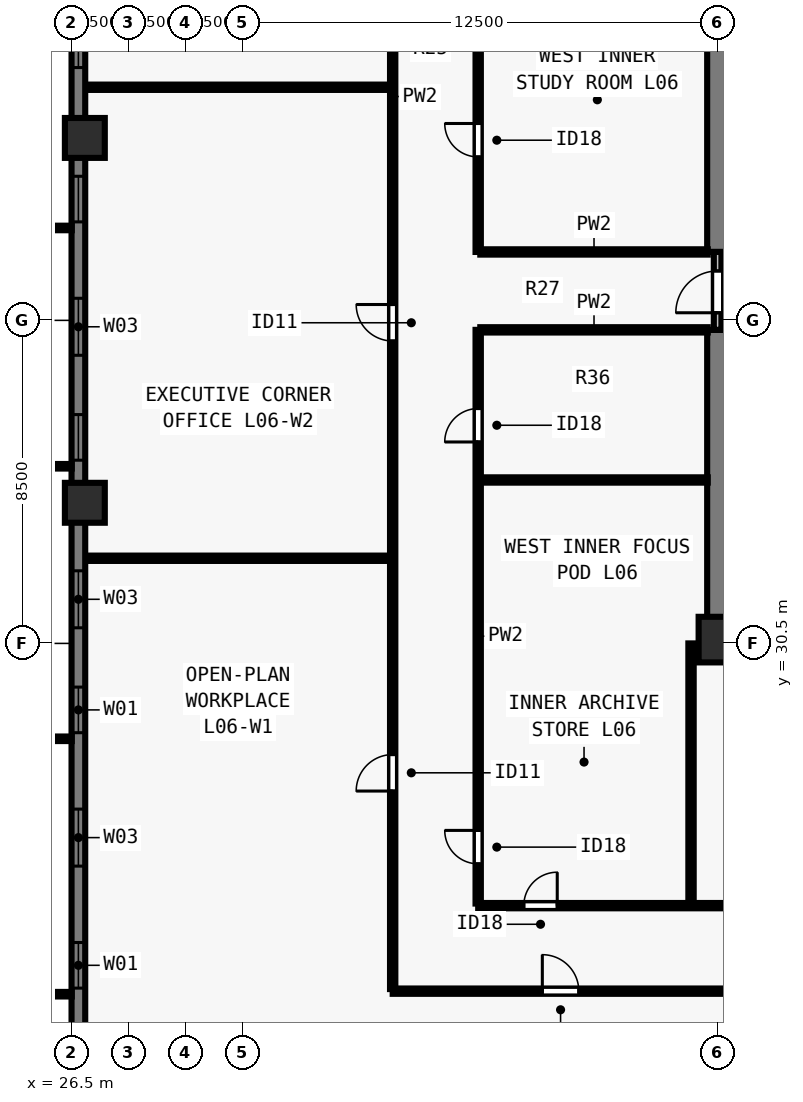
"""IFC4 building model, lengths in metres.
Left out: names, types, materials, properties, quantities, classifications, styles, units other than length and angle.
Written with IfcOpenShell. Run it as: python <this file> out.ifc"""

import sys

from ifc_helpers import new_model, si_unit, direction, frame, frame_2d, origin, origin_2d, place, context, subcontext, project, spatial, rectangle, extrude, element, fill, save


model = new_model("IFC4")
c1 = context("Model", 3, precision=1e-05, world=origin(), true_north=direction((0.0, 1.0)))
c2 = subcontext(c1, "Body", "Model", "MODEL_VIEW")
j1 = project(units=[si_unit("LENGTHUNIT", "METRE"), si_unit("PLANEANGLEUNIT", "RADIAN")], contexts=[c1])
p1 = place(None, origin())
s1 = spatial("IfcSite", under=j1, at=p1, CompositionType="ELEMENT")
p2 = place(p1, origin())
s2 = spatial("IfcBuilding", under=s1, at=p2, CompositionType="ELEMENT")
p3 = place(p2, frame((0.0, 0.0, 27.0)))
s3 = spatial("IfcBuildingStorey", under=s2, at=p3, CompositionType="ELEMENT", Elevation=27.0)
p4 = place(p3, frame((43.6, 30.6, 0.0), z_axis=(0.0, 0.0, 1.0), x_axis=(1.0, 0.0, 0.0)))
e1 = element("IfcColumn", 1, at=p4, inside=s3, PredefinedType="COLUMN", context=c2, shape_type="SweptSolid", body=[
    extrude(rectangle(XDim=1.2, YDim=1.2, at=origin_2d()), origin(), (0.0, 0.0, 1.0), 3.5),
])
for number, where, z_axis, x_axis in (
    (2, (26.85, 43.8, 0.0), (0.0, 0.0, 1.0), (0.0, 1.0, 0.0)),
    (3, (26.85, 34.2, 0.0), (0.0, 0.0, 1.0), (0.0, 1.0, 0.0)),
):
    element("IfcColumn", number, at=place(p3, frame(where, z_axis=z_axis, x_axis=x_axis)), inside=s3, PredefinedType="COLUMN", context=c2, shape_type="SweptSolid", body=[
        extrude(rectangle(XDim=1.05, YDim=1.05, at=origin_2d()), origin(), (0.0, 0.0, 1.0), 3.5),
    ])
p5 = place(p3, frame((26.68, 16.5, 0.0), z_axis=(0.0, 0.0, 1.0), x_axis=(0.0, 1.0, 0.0)))
e4 = element("IfcWall", 4, at=p5, inside=s3, PredefinedType="SOLIDWALL", context=c2, shape_type="SweptSolid", body=[
    extrude(rectangle(XDim=44.662, YDim=0.36, at=frame_2d((22.331, 0.0))), origin(), (0.0, 0.0, 1.0), 3.28),
])
p6 = place(p5, frame((4.93, 0.0, 0.8)))
e5 = element("IfcOpeningElement", 5, at=p6, cuts=e4, PredefinedType="OPENING", context=c2, shape_type="SweptSolid", body=[
    extrude(rectangle(XDim=1.2, YDim=1.544, at=frame_2d((0.6, 0.772))), frame((0.0, 0.19, 0.0), z_axis=(0.0, -1.0, 0.0), x_axis=(1.0, 0.0, 0.0)), (0.0, 0.0, 1.0), 0.38),
])
p7 = place(p5, frame((8.14, 0.0, 0.8)))
e6 = element("IfcOpeningElement", 6, at=p7, cuts=e4, PredefinedType="OPENING", context=c2, shape_type="SweptSolid", body=[
    extrude(rectangle(XDim=1.5, YDim=1.544, at=frame_2d((0.75, 0.772))), frame((0.0, 0.19, 0.0), z_axis=(0.0, -1.0, 0.0), x_axis=(1.0, 0.0, 0.0)), (0.0, 0.0, 1.0), 0.38),
])
p8 = place(p5, frame((11.65, 0.0, 0.8)))
e7 = element("IfcOpeningElement", 7, at=p8, cuts=e4, PredefinedType="OPENING", context=c2, shape_type="SweptSolid", body=[
    extrude(rectangle(XDim=1.2, YDim=1.544, at=frame_2d((0.6, 0.772))), frame((0.0, 0.19, 0.0), z_axis=(0.0, -1.0, 0.0), x_axis=(1.0, 0.0, 0.0)), (0.0, 0.0, 1.0), 0.38),
])
p9 = place(p5, frame((14.411, 0.0, 0.8)))
e8 = element("IfcOpeningElement", 8, at=p9, cuts=e4, PredefinedType="OPENING", context=c2, shape_type="SweptSolid", body=[
    extrude(rectangle(XDim=1.5, YDim=1.544, at=frame_2d((0.75, 0.772))), frame((0.0, 0.19, 0.0), z_axis=(0.0, -1.0, 0.0), x_axis=(1.0, 0.0, 0.0)), (0.0, 0.0, 1.0), 0.38),
])
p10 = place(p5, frame((18.821, 0.0, 0.8)))
e9 = element("IfcOpeningElement", 9, at=p10, cuts=e4, PredefinedType="OPENING", context=c2, shape_type="SweptSolid", body=[
    extrude(rectangle(XDim=1.2, YDim=1.544, at=frame_2d((0.6, 0.772))), frame((0.0, 0.19, 0.0), z_axis=(0.0, -1.0, 0.0), x_axis=(1.0, 0.0, 0.0)), (0.0, 0.0, 1.0), 0.38),
])
p11 = place(p5, frame((21.581, 0.0, 0.8)))
e10 = element("IfcOpeningElement", 10, at=p11, cuts=e4, PredefinedType="OPENING", context=c2, shape_type="SweptSolid", body=[
    extrude(rectangle(XDim=1.5, YDim=1.544, at=frame_2d((0.75, 0.772))), frame((0.0, 0.19, 0.0), z_axis=(0.0, -1.0, 0.0), x_axis=(1.0, 0.0, 0.0)), (0.0, 0.0, 1.0), 0.38),
])
p12 = place(p5, frame((25.091, 0.0, 0.8)))
e11 = element("IfcOpeningElement", 11, at=p12, cuts=e4, PredefinedType="OPENING", context=c2, shape_type="SweptSolid", body=[
    extrude(rectangle(XDim=1.2, YDim=1.544, at=frame_2d((0.6, 0.772))), frame((0.0, 0.19, 0.0), z_axis=(0.0, -1.0, 0.0), x_axis=(1.0, 0.0, 0.0)), (0.0, 0.0, 1.0), 0.38),
])
p13 = place(p5, frame((29.151, 0.0, 0.8)))
e12 = element("IfcOpeningElement", 12, at=p13, cuts=e4, PredefinedType="OPENING", context=c2, shape_type="SweptSolid", body=[
    extrude(rectangle(XDim=1.5, YDim=1.544, at=frame_2d((0.75, 0.772))), frame((0.0, 0.19, 0.0), z_axis=(0.0, -1.0, 0.0), x_axis=(1.0, 0.0, 0.0)), (0.0, 0.0, 1.0), 0.38),
])
p14 = place(p5, frame((31.812, 0.0, 0.8)))
e13 = element("IfcOpeningElement", 13, at=p14, cuts=e4, PredefinedType="OPENING", context=c2, shape_type="SweptSolid", body=[
    extrude(rectangle(XDim=1.2, YDim=1.544, at=frame_2d((0.6, 0.772))), frame((0.0, 0.19, 0.0), z_axis=(0.0, -1.0, 0.0), x_axis=(1.0, 0.0, 0.0)), (0.0, 0.0, 1.0), 0.38),
])
p15 = place(p5, frame((35.022, 0.0, 0.8)))
e14 = element("IfcOpeningElement", 14, at=p15, cuts=e4, PredefinedType="OPENING", context=c2, shape_type="SweptSolid", body=[
    extrude(rectangle(XDim=1.5, YDim=1.544, at=frame_2d((0.75, 0.772))), frame((0.0, 0.19, 0.0), z_axis=(0.0, -1.0, 0.0), x_axis=(1.0, 0.0, 0.0)), (0.0, 0.0, 1.0), 0.38),
])
p16 = place(p5, frame((38.532, 0.0, 0.8)))
e15 = element("IfcOpeningElement", 15, at=p16, cuts=e4, PredefinedType="OPENING", context=c2, shape_type="SweptSolid", body=[
    extrude(rectangle(XDim=1.2, YDim=1.544, at=frame_2d((0.6, 0.772))), frame((0.0, 0.19, 0.0), z_axis=(0.0, -1.0, 0.0), x_axis=(1.0, 0.0, 0.0)), (0.0, 0.0, 1.0), 0.38),
])
p17 = place(p3, frame((43.225, 30.5, 0.0), z_axis=(0.0, 0.0, 1.0), x_axis=(1.0, 0.0, 0.0)))
e16 = element("IfcWall", 16, at=p17, inside=s3, PredefinedType="SHEAR", context=c2, shape_type="SweptSolid", body=[
    extrude(rectangle(XDim=17.55, YDim=0.55, at=frame_2d((8.775, 0.0))), origin(), (0.0, 0.0, 1.0), 3.28),
])
p18 = place(p3, frame((43.5, 30.765, 0.0), z_axis=(0.0, 0.0, 1.0), x_axis=(0.0, 1.0, 0.0)))
e17 = element("IfcWall", 17, at=p18, inside=s3, PredefinedType="SHEAR", context=c2, shape_type="SweptSolid", body=[
    extrude(rectangle(XDim=7.985, YDim=0.55, at=frame_2d((3.993, 0.0))), origin(), (0.0, 0.0, 1.0), 3.28),
])
p19 = place(p3, frame((43.5, 40.8, 0.0), z_axis=(0.0, 0.0, 1.0), x_axis=(0.0, 1.0, 0.0)))
e18 = element("IfcWall", 18, at=p19, inside=s3, PredefinedType="SHEAR", context=c2, shape_type="SweptSolid", body=[
    extrude(rectangle(XDim=6.435, YDim=0.55, at=frame_2d((3.218, 0.0))), origin(), (0.0, 0.0, 1.0), 3.28),
])
p20 = place(p3, frame((43.5, 38.75, 0.0), z_axis=(0.0, 0.0, 1.0), x_axis=(0.0, 1.0, 0.0)))
e19 = element("IfcWall", 19, at=p20, inside=s3, PredefinedType="SOLIDWALL", context=c2, shape_type="SweptSolid", body=[
    extrude(rectangle(XDim=2.05, YDim=0.2, at=frame_2d((1.025, 0.0))), origin(), (0.0, 0.0, 1.0), 3.28),
])
p21 = place(p20, frame((0.45, 0.0, 0.0)))
e20 = element("IfcOpeningElement", 20, at=p21, cuts=e19, PredefinedType="OPENING", context=c2, shape_type="SweptSolid", body=[
    extrude(rectangle(XDim=1.1, YDim=2.15, at=frame_2d((0.55, 1.075))), frame((0.0, 0.11, 0.0), z_axis=(0.0, -1.0, 0.0), x_axis=(1.0, 0.0, 0.0)), (0.0, 0.0, 1.0), 0.22),
])
p22 = place(p3, frame((34.95, 21.35, 0.0), z_axis=(0.0, 0.0, 1.0), x_axis=(1.0, 0.0, 0.0)))
e21 = element("IfcWall", 21, at=p22, inside=s3, PredefinedType="PARTITIONING", context=c2, shape_type="SweptSolid", body=[
    extrude(rectangle(XDim=34.1, YDim=0.14, at=frame_2d((17.05, 0.0))), origin(), (0.0, 0.0, 1.0), 3.28),
])
p23 = place(p22, frame((3.938, 0.0, 0.0)))
e22 = element("IfcOpeningElement", 22, at=p23, cuts=e21, PredefinedType="OPENING", context=c2, shape_type="SweptSolid", body=[
    extrude(rectangle(XDim=0.96, YDim=2.12, at=frame_2d((0.48, 1.06))), frame((0.0, 0.08, 0.0), z_axis=(0.0, -1.0, 0.0), x_axis=(1.0, 0.0, 0.0)), (0.0, 0.0, 1.0), 0.16),
])
p24 = place(p22, frame((28.617, 0.0, 0.0)))
e23 = element("IfcOpeningElement", 23, at=p24, cuts=e21, PredefinedType="OPENING", context=c2, shape_type="SweptSolid", body=[
    extrude(rectangle(XDim=0.96, YDim=2.12, at=frame_2d((0.48, 1.06))), frame((0.0, 0.08, 0.0), z_axis=(0.0, -1.0, 0.0), x_axis=(1.0, 0.0, 0.0)), (0.0, 0.0, 1.0), 0.16),
])
p25 = place(p3, frame((34.95, 21.405, 0.0), z_axis=(0.0, 0.0, 1.0), x_axis=(0.0, 1.0, 0.0)))
e24 = element("IfcWall", 24, at=p25, inside=s3, PredefinedType="PARTITIONING", context=c2, shape_type="SweptSolid", body=[
    extrude(rectangle(XDim=35.19, YDim=0.14, at=frame_2d((17.595, 0.0))), origin(), (0.0, 0.0, 1.0), 3.28),
])
p26 = place(p25, frame((5.21, 0.0, 0.0)))
e25 = element("IfcOpeningElement", 25, at=p26, cuts=e24, PredefinedType="OPENING", context=c2, shape_type="SweptSolid", body=[
    extrude(rectangle(XDim=0.96, YDim=2.12, at=frame_2d((0.48, 1.06))), frame((0.0, 0.08, 0.0), z_axis=(0.0, -1.0, 0.0), x_axis=(1.0, 0.0, 0.0)), (0.0, 0.0, 1.0), 0.16),
])
p27 = place(p25, frame((17.052, 0.0, 0.0)))
e26 = element("IfcOpeningElement", 26, at=p27, cuts=e24, PredefinedType="OPENING", context=c2, shape_type="SweptSolid", body=[
    extrude(rectangle(XDim=0.96, YDim=2.12, at=frame_2d((0.48, 1.06))), frame((0.0, 0.08, 0.0), z_axis=(0.0, -1.0, 0.0), x_axis=(1.0, 0.0, 0.0)), (0.0, 0.0, 1.0), 0.16),
])
p28 = place(p25, frame((28.957, 0.0, 0.0)))
e27 = element("IfcOpeningElement", 27, at=p28, cuts=e24, PredefinedType="OPENING", context=c2, shape_type="SweptSolid", body=[
    extrude(rectangle(XDim=0.96, YDim=2.12, at=frame_2d((0.48, 1.06))), frame((0.0, 0.08, 0.0), z_axis=(0.0, -1.0, 0.0), x_axis=(1.0, 0.0, 0.0)), (0.0, 0.0, 1.0), 0.16),
])
p29 = place(p3, frame((37.2, 23.6, 0.0), z_axis=(0.0, 0.0, 1.0), x_axis=(1.0, 0.0, 0.0)))
e28 = element("IfcWall", 28, at=p29, inside=s3, PredefinedType="PARTITIONING", context=c2, shape_type="SweptSolid", body=[
    extrude(rectangle(XDim=29.6, YDim=0.14, at=frame_2d((14.8, 0.0))), origin(), (0.0, 0.0, 1.0), 3.28),
])
p30 = place(p29, frame((1.2, 0.0, 0.0)))
e29 = element("IfcOpeningElement", 29, at=p30, cuts=e28, PredefinedType="OPENING", context=c2, shape_type="SweptSolid", body=[
    extrude(rectangle(XDim=0.88, YDim=2.1, at=frame_2d((0.44, 1.05))), frame((0.0, 0.08, 0.0), z_axis=(0.0, -1.0, 0.0), x_axis=(1.0, 0.0, 0.0)), (0.0, 0.0, 1.0), 0.16),
])
p31 = place(p29, frame((11.3, 0.0, 0.0)))
e30 = element("IfcOpeningElement", 30, at=p31, cuts=e28, PredefinedType="OPENING", context=c2, shape_type="SweptSolid", body=[
    extrude(rectangle(XDim=0.88, YDim=2.1, at=frame_2d((0.44, 1.05))), frame((0.0, 0.08, 0.0), z_axis=(0.0, -1.0, 0.0), x_axis=(1.0, 0.0, 0.0)), (0.0, 0.0, 1.0), 0.16),
])
p32 = place(p29, frame((21.8, 0.0, 0.0)))
e31 = element("IfcOpeningElement", 31, at=p32, cuts=e28, PredefinedType="OPENING", context=c2, shape_type="SweptSolid", body=[
    extrude(rectangle(XDim=0.88, YDim=2.1, at=frame_2d((0.44, 1.05))), frame((0.0, 0.08, 0.0), z_axis=(0.0, -1.0, 0.0), x_axis=(1.0, 0.0, 0.0)), (0.0, 0.0, 1.0), 0.16),
])
p33 = place(p3, frame((37.2, 23.655, 0.0), z_axis=(0.0, 0.0, 1.0), x_axis=(0.0, 1.0, 0.0)))
e32 = element("IfcWall", 32, at=p33, inside=s3, PredefinedType="PARTITIONING", context=c2, shape_type="SweptSolid", body=[
    extrude(rectangle(XDim=15.095, YDim=0.14, at=frame_2d((7.547, 0.0))), origin(), (0.0, 0.0, 1.0), 3.28),
])
p34 = place(p33, frame((1.045, 0.0, 0.0)))
e33 = element("IfcOpeningElement", 33, at=p34, cuts=e32, PredefinedType="OPENING", context=c2, shape_type="SweptSolid", body=[
    extrude(rectangle(XDim=0.88, YDim=2.1, at=frame_2d((0.44, 1.05))), frame((0.0, 0.08, 0.0), z_axis=(0.0, -1.0, 0.0), x_axis=(1.0, 0.0, 0.0)), (0.0, 0.0, 1.0), 0.16),
])
p35 = place(p33, frame((12.145, 0.0, 0.0)))
e34 = element("IfcOpeningElement", 34, at=p35, cuts=e32, PredefinedType="OPENING", context=c2, shape_type="SweptSolid", body=[
    extrude(rectangle(XDim=0.88, YDim=2.1, at=frame_2d((0.44, 1.05))), frame((0.0, 0.08, 0.0), z_axis=(0.0, -1.0, 0.0), x_axis=(1.0, 0.0, 0.0)), (0.0, 0.0, 1.0), 0.16),
])
p36 = place(p3, frame((37.2, 40.8, 0.0), z_axis=(0.0, 0.0, 1.0), x_axis=(0.0, 1.0, 0.0)))
e35 = element("IfcWall", 35, at=p36, inside=s3, PredefinedType="PARTITIONING", context=c2, shape_type="SweptSolid", body=[
    extrude(rectangle(XDim=13.545, YDim=0.14, at=frame_2d((6.772, 0.0))), origin(), (0.0, 0.0, 1.0), 3.28),
])
p37 = place(p36, frame((2.5, 0.0, 0.0)))
e36 = element("IfcOpeningElement", 36, at=p37, cuts=e35, PredefinedType="OPENING", context=c2, shape_type="SweptSolid", body=[
    extrude(rectangle(XDim=0.88, YDim=2.1, at=frame_2d((0.44, 1.05))), frame((0.0, 0.08, 0.0), z_axis=(0.0, -1.0, 0.0), x_axis=(1.0, 0.0, 0.0)), (0.0, 0.0, 1.0), 0.16),
])
for number, where, z_axis, x_axis in (
    (37, (37.255, 38.75, 0.0), (0.0, 0.0, 1.0), (1.0, 0.0, 0.0)),
    (38, (37.255, 40.8, 0.0), (0.0, 0.0, 1.0), (1.0, 0.0, 0.0)),
):
    element("IfcWall", number, at=place(p3, frame(where, z_axis=z_axis, x_axis=x_axis)), inside=s3, PredefinedType="PARTITIONING", context=c2, shape_type="SweptSolid", body=[
        extrude(rectangle(XDim=5.985, YDim=0.14, at=frame_2d((2.993, 0.0))), origin(), (0.0, 0.0, 1.0), 3.28),
    ])
p38 = place(p3, frame((42.8, 23.655, 0.0), z_axis=(0.0, 0.0, 1.0), x_axis=(0.0, 1.0, 0.0)))
e39 = element("IfcWall", 39, at=p38, inside=s3, PredefinedType="PARTITIONING", context=c2, shape_type="SweptSolid", body=[
    extrude(rectangle(XDim=6.845, YDim=0.14, at=frame_2d((3.422, 0.0))), origin(), (0.0, 0.0, 1.0), 2.439),
])
p39 = place(p3, frame((37.255, 34.8, 0.0), z_axis=(0.0, 0.0, 1.0), x_axis=(1.0, 0.0, 0.0)))
e40 = element("IfcWall", 40, at=p39, inside=s3, PredefinedType="PARTITIONING", context=c2, shape_type="SweptSolid", body=[
    extrude(rectangle(XDim=5.985, YDim=0.14, at=frame_2d((2.993, 0.0))), origin(), (0.0, 0.0, 1.0), 3.28),
])
for number, where, z_axis, x_axis in (
    (41, (26.92, 32.74, 0.0), (0.0, 0.0, 1.0), (1.0, 0.0, 0.0)),
    (42, (26.92, 45.134, 0.0), (0.0, 0.0, 1.0), (1.0, 0.0, 0.0)),
):
    element("IfcWall", number, at=place(p3, frame(where, z_axis=z_axis, x_axis=x_axis)), inside=s3, PredefinedType="PARTITIONING", context=c2, shape_type="SweptSolid", body=[
        extrude(rectangle(XDim=7.93, YDim=0.14, at=frame_2d((3.965, 0.0))), origin(), (0.0, 0.0, 1.0), 2.439),
    ])
p40 = place(p6, origin())
e43 = element("IfcWindow", 43, at=p40, inside=s3, PartitioningType="SINGLE_PANEL", PredefinedType="WINDOW", context=c2, shape_type="SweptSolid", body=[
    extrude(rectangle(XDim=1.2, YDim=1.544, at=frame_2d((0.6, 0.772))), frame((0.0, -0.05, 0.0), z_axis=(0.0, -1.0, 0.0), x_axis=(1.0, 0.0, 0.0)), (0.0, 0.0, 1.0), 0.06),
])
fill(e5, e43)
p41 = place(p7, origin())
e44 = element("IfcWindow", 44, at=p41, inside=s3, PartitioningType="SINGLE_PANEL", PredefinedType="WINDOW", context=c2, shape_type="SweptSolid", body=[
    extrude(rectangle(XDim=1.5, YDim=1.544, at=frame_2d((0.75, 0.772))), frame((0.0, -0.05, 0.0), z_axis=(0.0, -1.0, 0.0), x_axis=(1.0, 0.0, 0.0)), (0.0, 0.0, 1.0), 0.06),
])
fill(e6, e44)
p42 = place(p8, origin())
e45 = element("IfcWindow", 45, at=p42, inside=s3, PartitioningType="SINGLE_PANEL", PredefinedType="WINDOW", context=c2, shape_type="SweptSolid", body=[
    extrude(rectangle(XDim=1.2, YDim=1.544, at=frame_2d((0.6, 0.772))), frame((0.0, -0.05, 0.0), z_axis=(0.0, -1.0, 0.0), x_axis=(1.0, 0.0, 0.0)), (0.0, 0.0, 1.0), 0.06),
])
fill(e7, e45)
p43 = place(p9, origin())
e46 = element("IfcWindow", 46, at=p43, inside=s3, PartitioningType="SINGLE_PANEL", PredefinedType="WINDOW", context=c2, shape_type="SweptSolid", body=[
    extrude(rectangle(XDim=1.5, YDim=1.544, at=frame_2d((0.75, 0.772))), frame((0.0, -0.05, 0.0), z_axis=(0.0, -1.0, 0.0), x_axis=(1.0, 0.0, 0.0)), (0.0, 0.0, 1.0), 0.06),
])
fill(e8, e46)
p44 = place(p10, origin())
e47 = element("IfcWindow", 47, at=p44, inside=s3, PartitioningType="SINGLE_PANEL", PredefinedType="WINDOW", context=c2, shape_type="SweptSolid", body=[
    extrude(rectangle(XDim=1.2, YDim=1.544, at=frame_2d((0.6, 0.772))), frame((0.0, -0.05, 0.0), z_axis=(0.0, -1.0, 0.0), x_axis=(1.0, 0.0, 0.0)), (0.0, 0.0, 1.0), 0.06),
])
fill(e9, e47)
p45 = place(p11, origin())
e48 = element("IfcWindow", 48, at=p45, inside=s3, PartitioningType="SINGLE_PANEL", PredefinedType="WINDOW", context=c2, shape_type="SweptSolid", body=[
    extrude(rectangle(XDim=1.5, YDim=1.544, at=frame_2d((0.75, 0.772))), frame((0.0, -0.05, 0.0), z_axis=(0.0, -1.0, 0.0), x_axis=(1.0, 0.0, 0.0)), (0.0, 0.0, 1.0), 0.06),
])
fill(e10, e48)
p46 = place(p12, origin())
e49 = element("IfcWindow", 49, at=p46, inside=s3, PartitioningType="SINGLE_PANEL", PredefinedType="WINDOW", context=c2, shape_type="SweptSolid", body=[
    extrude(rectangle(XDim=1.2, YDim=1.544, at=frame_2d((0.6, 0.772))), frame((0.0, -0.05, 0.0), z_axis=(0.0, -1.0, 0.0), x_axis=(1.0, 0.0, 0.0)), (0.0, 0.0, 1.0), 0.06),
])
fill(e11, e49)
p47 = place(p13, origin())
e50 = element("IfcWindow", 50, at=p47, inside=s3, PartitioningType="SINGLE_PANEL", PredefinedType="WINDOW", context=c2, shape_type="SweptSolid", body=[
    extrude(rectangle(XDim=1.5, YDim=1.544, at=frame_2d((0.75, 0.772))), frame((0.0, -0.05, 0.0), z_axis=(0.0, -1.0, 0.0), x_axis=(1.0, 0.0, 0.0)), (0.0, 0.0, 1.0), 0.06),
])
fill(e12, e50)
p48 = place(p21, origin())
e51 = element("IfcDoor", 51, at=p48, inside=s3, OperationType="SINGLE_SWING_LEFT", PredefinedType="DOOR", context=c2, shape_type="SweptSolid", body=[
    extrude(rectangle(XDim=1.1, YDim=2.15, at=frame_2d((0.55, 1.075))), frame((0.0, 0.025, 0.0), z_axis=(0.0, -1.0, 0.0), x_axis=(1.0, 0.0, 0.0)), (0.0, 0.0, 1.0), 0.05),
])
fill(e20, e51)
p49 = place(p30, origin())
e52 = element("IfcDoor", 52, at=p49, inside=s3, OperationType="SINGLE_SWING_RIGHT", PredefinedType="DOOR", context=c2, shape_type="SweptSolid", body=[
    extrude(rectangle(XDim=0.88, YDim=2.1, at=frame_2d((0.44, 1.05))), frame((0.0, 0.025, 0.0), z_axis=(0.0, -1.0, 0.0), x_axis=(1.0, 0.0, 0.0)), (0.0, 0.0, 1.0), 0.05),
])
fill(e29, e52)
p50 = place(p34, origin())
e53 = element("IfcDoor", 53, at=p50, inside=s3, OperationType="SINGLE_SWING_RIGHT", PredefinedType="DOOR", context=c2, shape_type="SweptSolid", body=[
    extrude(rectangle(XDim=0.88, YDim=2.1, at=frame_2d((0.44, 1.05))), frame((0.0, 0.025, 0.0), z_axis=(0.0, -1.0, 0.0), x_axis=(1.0, 0.0, 0.0)), (0.0, 0.0, 1.0), 0.05),
])
fill(e33, e53)
p51 = place(p35, origin())
e54 = element("IfcDoor", 54, at=p51, inside=s3, OperationType="SINGLE_SWING_LEFT", PredefinedType="DOOR", context=c2, shape_type="SweptSolid", body=[
    extrude(rectangle(XDim=0.88, YDim=2.1, at=frame_2d((0.44, 1.05))), frame((0.0, 0.025, 0.0), z_axis=(0.0, -1.0, 0.0), x_axis=(1.0, 0.0, 0.0)), (0.0, 0.0, 1.0), 0.05),
])
fill(e34, e54)
p52 = place(p37, origin())
e55 = element("IfcDoor", 55, at=p52, inside=s3, OperationType="SINGLE_SWING_RIGHT", PredefinedType="DOOR", context=c2, shape_type="SweptSolid", body=[
    extrude(rectangle(XDim=0.88, YDim=2.1, at=frame_2d((0.44, 1.05))), frame((0.0, 0.025, 0.0), z_axis=(0.0, -1.0, 0.0), x_axis=(1.0, 0.0, 0.0)), (0.0, 0.0, 1.0), 0.05),
])
fill(e36, e55)
p53 = place(p23, origin())
e56 = element("IfcDoor", 56, at=p53, inside=s3, OperationType="SINGLE_SWING_LEFT", PredefinedType="DOOR", context=c2, shape_type="SweptSolid", body=[
    extrude(rectangle(XDim=0.96, YDim=2.12, at=frame_2d((0.48, 1.06))), frame((0.0, 0.025, 0.0), z_axis=(0.0, -1.0, 0.0), x_axis=(1.0, 0.0, 0.0)), (0.0, 0.0, 1.0), 0.05),
])
fill(e22, e56)
p54 = place(p26, origin())
e57 = element("IfcDoor", 57, at=p54, inside=s3, OperationType="SINGLE_SWING_LEFT", PredefinedType="DOOR", context=c2, shape_type="SweptSolid", body=[
    extrude(rectangle(XDim=0.96, YDim=2.12, at=frame_2d((0.48, 1.06))), frame((0.0, 0.025, 0.0), z_axis=(0.0, -1.0, 0.0), x_axis=(1.0, 0.0, 0.0)), (0.0, 0.0, 1.0), 0.05),
])
fill(e25, e57)
p55 = place(p27, origin())
e58 = element("IfcDoor", 58, at=p55, inside=s3, OperationType="SINGLE_SWING_RIGHT", PredefinedType="DOOR", context=c2, shape_type="SweptSolid", body=[
    extrude(rectangle(XDim=0.96, YDim=2.12, at=frame_2d((0.48, 1.06))), frame((0.0, 0.025, 0.0), z_axis=(0.0, -1.0, 0.0), x_axis=(1.0, 0.0, 0.0)), (0.0, 0.0, 1.0), 0.05),
])
fill(e26, e58)
save(model, sys.argv[1])
